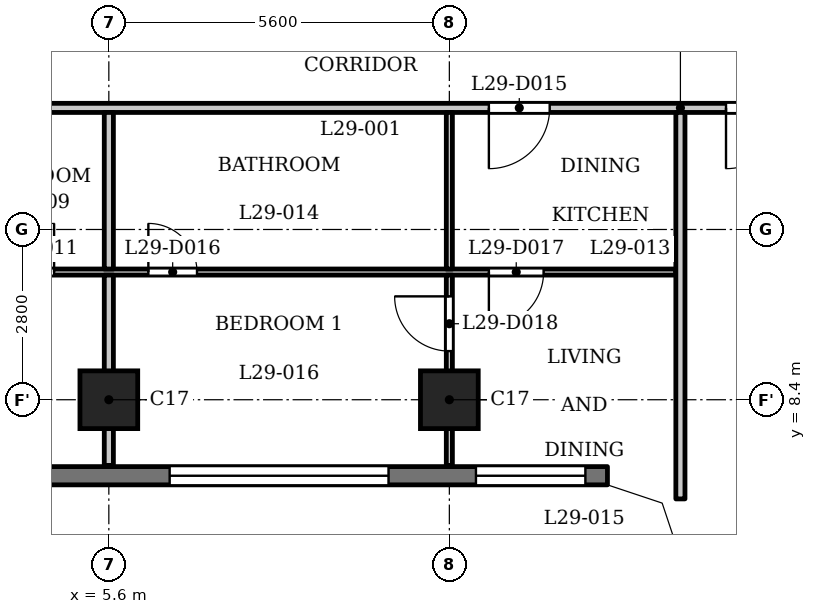
"""IFC4 building model, lengths in metres.
Left out: names, types, materials, properties, quantities, classifications, styles, units other than length and angle.
Written with IfcOpenShell. Run it as: python <this file> out.ifc"""

import sys

from ifc_helpers import new_model, si_unit, direction, frame, frame_2d, origin, origin_2d, place, context, subcontext, project, spatial, polyline, rectangle, outline, extrude, element, fill, save


model = new_model("IFC4")
c1 = context("Model", 3, precision=1e-05, world=origin(), true_north=direction((0.0, 1.0)))
c2 = subcontext(c1, "Body", "Model", "MODEL_VIEW")
j1 = project(units=[si_unit("LENGTHUNIT", "METRE"), si_unit("PLANEANGLEUNIT", "RADIAN")], contexts=[c1])
p1 = place(None, origin())
s1 = spatial("IfcSite", under=j1, at=p1, CompositionType="ELEMENT")
p2 = place(p1, origin())
s2 = spatial("IfcBuilding", under=s1, at=p2, CompositionType="ELEMENT")
p3 = place(p2, frame((0.0, 0.0, 114.8)))
s3 = spatial("IfcBuildingStorey", under=s2, at=p3, CompositionType="ELEMENT", Elevation=114.8)
for number, where, z_axis, x_axis in (
    (1, (5.6, 8.4, 0.0), (0.0, 0.0, 1.0), (1.0, 0.0, 0.0)),
    (2, (11.2, 8.4, 0.0), (0.0, 0.0, 1.0), (1.0, 0.0, 0.0)),
):
    element("IfcColumn", number, at=place(p3, frame(where, z_axis=z_axis, x_axis=x_axis)), inside=s3, PredefinedType="COLUMN", context=c2, shape_type="SweptSolid", body=[
        extrude(rectangle(XDim=0.95, YDim=0.95, at=origin_2d()), origin(), (0.0, 0.0, 1.0), 3.5),
    ])
p4 = place(p3, frame((-13.8, 7.15, 0.0), z_axis=(0.0, 0.0, 1.0), x_axis=(1.0, 0.0, 0.0)))
e3 = element("IfcWall", 3, at=p4, inside=s3, PredefinedType="SOLIDWALL", context=c2, shape_type="SweptSolid", body=[
    extrude(rectangle(XDim=27.6, YDim=0.3, at=frame_2d((13.8, 0.0))), origin(), (0.0, 0.0, 1.0), 3.2),
])
p5 = place(p4, frame((0.363, 0.0, 0.9)))
e4 = element("IfcOpeningElement", 4, at=p5, cuts=e3, PredefinedType="OPENING", context=c2, shape_type="SweptSolid", body=[
    extrude(rectangle(XDim=1.8, YDim=1.25, at=frame_2d((0.9, 0.625))), frame((0.0, 0.16, 0.0), z_axis=(0.0, -1.0, 0.0), x_axis=(1.0, 0.0, 0.0)), (0.0, 0.0, 1.0), 0.32),
])
p6 = place(p4, frame((3.6, 0.0, 1.2)))
e5 = element("IfcOpeningElement", 5, at=p6, cuts=e3, PredefinedType="OPENING", context=c2, shape_type="SweptSolid", body=[
    extrude(rectangle(XDim=3.6, YDim=0.95, at=frame_2d((1.8, 0.475))), frame((0.0, 0.16, 0.0), z_axis=(0.0, -1.0, 0.0), x_axis=(1.0, 0.0, 0.0)), (0.0, 0.0, 1.0), 0.32),
])
p7 = place(p4, frame((8.6, 0.0, 0.9)))
e6 = element("IfcOpeningElement", 6, at=p7, cuts=e3, PredefinedType="OPENING", context=c2, shape_type="SweptSolid", body=[
    extrude(rectangle(XDim=1.8, YDim=1.25, at=frame_2d((0.9, 0.625))), frame((0.0, 0.16, 0.0), z_axis=(0.0, -1.0, 0.0), x_axis=(1.0, 0.0, 0.0)), (0.0, 0.0, 1.0), 0.32),
])
p8 = place(p4, frame((11.4, 0.0, 0.9)))
e7 = element("IfcOpeningElement", 7, at=p8, cuts=e3, PredefinedType="OPENING", context=c2, shape_type="SweptSolid", body=[
    extrude(rectangle(XDim=1.8, YDim=1.25, at=frame_2d((0.9, 0.625))), frame((0.0, 0.16, 0.0), z_axis=(0.0, -1.0, 0.0), x_axis=(1.0, 0.0, 0.0)), (0.0, 0.0, 1.0), 0.32),
])
p9 = place(p4, frame((14.8, 0.0, 1.2)))
e8 = element("IfcOpeningElement", 8, at=p9, cuts=e3, PredefinedType="OPENING", context=c2, shape_type="SweptSolid", body=[
    extrude(rectangle(XDim=3.6, YDim=0.95, at=frame_2d((1.8, 0.475))), frame((0.0, 0.16, 0.0), z_axis=(0.0, -1.0, 0.0), x_axis=(1.0, 0.0, 0.0)), (0.0, 0.0, 1.0), 0.32),
])
p10 = place(p4, frame((20.4, 0.0, 1.2)))
e9 = element("IfcOpeningElement", 9, at=p10, cuts=e3, PredefinedType="OPENING", context=c2, shape_type="SweptSolid", body=[
    extrude(rectangle(XDim=3.6, YDim=0.95, at=frame_2d((1.8, 0.475))), frame((0.0, 0.16, 0.0), z_axis=(0.0, -1.0, 0.0), x_axis=(1.0, 0.0, 0.0)), (0.0, 0.0, 1.0), 0.32),
])
p11 = place(p4, frame((25.438, 0.0, 0.9)))
e10 = element("IfcOpeningElement", 10, at=p11, cuts=e3, PredefinedType="OPENING", context=c2, shape_type="SweptSolid", body=[
    extrude(rectangle(XDim=1.8, YDim=1.25, at=frame_2d((0.9, 0.625))), frame((0.0, 0.16, 0.0), z_axis=(0.0, -1.0, 0.0), x_axis=(1.0, 0.0, 0.0)), (0.0, 0.0, 1.0), 0.32),
])
p12 = place(p3, frame((-14.925, 10.5, 0.0), z_axis=(0.0, 0.0, 1.0), x_axis=(1.0, 0.0, 0.0)))
e11 = element("IfcWall", 11, at=p12, inside=s3, PredefinedType="PARTITIONING", context=c2, shape_type="SweptSolid", body=[
    extrude(rectangle(XDim=29.85, YDim=0.1, at=frame_2d((14.925, 0.0))), origin(), (0.0, 0.0, 1.0), 3.2),
])
p13 = place(p12, frame((0.525, 0.0, 0.0)))
e12 = element("IfcOpeningElement", 12, at=p13, cuts=e11, PredefinedType="OPENING", context=c2, shape_type="SweptSolid", body=[
    extrude(rectangle(XDim=0.8, YDim=2.1, at=frame_2d((0.4, 1.05))), frame((0.0, 0.06, 0.0), z_axis=(0.0, -1.0, 0.0), x_axis=(1.0, 0.0, 0.0)), (0.0, 0.0, 1.0), 0.12),
])
p14 = place(p12, frame((4.375, 0.0, 0.0)))
e13 = element("IfcOpeningElement", 13, at=p14, cuts=e11, PredefinedType="OPENING", context=c2, shape_type="SweptSolid", body=[
    extrude(rectangle(XDim=0.9, YDim=2.1, at=frame_2d((0.45, 1.05))), frame((0.0, 0.06, 0.0), z_axis=(0.0, -1.0, 0.0), x_axis=(1.0, 0.0, 0.0)), (0.0, 0.0, 1.0), 0.12),
])
p15 = place(p12, frame((18.825, 0.0, 0.0)))
e14 = element("IfcOpeningElement", 14, at=p15, cuts=e11, PredefinedType="OPENING", context=c2, shape_type="SweptSolid", body=[
    extrude(rectangle(XDim=0.8, YDim=2.1, at=frame_2d((0.4, 1.05))), frame((0.0, 0.06, 0.0), z_axis=(0.0, -1.0, 0.0), x_axis=(1.0, 0.0, 0.0)), (0.0, 0.0, 1.0), 0.12),
])
p16 = place(p12, frame((16.325, 0.0, 0.0)))
e15 = element("IfcOpeningElement", 15, at=p16, cuts=e11, PredefinedType="OPENING", context=c2, shape_type="SweptSolid", body=[
    extrude(rectangle(XDim=0.9, YDim=2.1, at=frame_2d((0.45, 1.05))), frame((0.0, 0.06, 0.0), z_axis=(0.0, -1.0, 0.0), x_axis=(1.0, 0.0, 0.0)), (0.0, 0.0, 1.0), 0.12),
])
p17 = place(p12, frame((10.225, 0.0, 0.0)))
e16 = element("IfcOpeningElement", 16, at=p17, cuts=e11, PredefinedType="OPENING", context=c2, shape_type="SweptSolid", body=[
    extrude(rectangle(XDim=0.9, YDim=2.1, at=frame_2d((0.45, 1.05))), frame((0.0, 0.06, 0.0), z_axis=(0.0, -1.0, 0.0), x_axis=(1.0, 0.0, 0.0)), (0.0, 0.0, 1.0), 0.12),
])
p18 = place(p12, frame((13.325, 0.0, 0.0)))
e17 = element("IfcOpeningElement", 17, at=p18, cuts=e11, PredefinedType="OPENING", context=c2, shape_type="SweptSolid", body=[
    extrude(rectangle(XDim=0.9, YDim=2.1, at=frame_2d((0.45, 1.05))), frame((0.0, 0.06, 0.0), z_axis=(0.0, -1.0, 0.0), x_axis=(1.0, 0.0, 0.0)), (0.0, 0.0, 1.0), 0.12),
])
p19 = place(p12, frame((21.175, 0.0, 0.0)))
e18 = element("IfcOpeningElement", 18, at=p19, cuts=e11, PredefinedType="OPENING", context=c2, shape_type="SweptSolid", body=[
    extrude(rectangle(XDim=0.8, YDim=2.1, at=frame_2d((0.4, 1.05))), frame((0.0, 0.06, 0.0), z_axis=(0.0, -1.0, 0.0), x_axis=(1.0, 0.0, 0.0)), (0.0, 0.0, 1.0), 0.12),
])
p20 = place(p12, frame((26.775, 0.0, 0.0)))
e19 = element("IfcOpeningElement", 19, at=p20, cuts=e11, PredefinedType="OPENING", context=c2, shape_type="SweptSolid", body=[
    extrude(rectangle(XDim=0.9, YDim=2.1, at=frame_2d((0.45, 1.05))), frame((0.0, 0.06, 0.0), z_axis=(0.0, -1.0, 0.0), x_axis=(1.0, 0.0, 0.0)), (0.0, 0.0, 1.0), 0.12),
])
p21 = place(p3, frame((-17.4, 13.2, 0.0), z_axis=(0.0, 0.0, 1.0), x_axis=(1.0, 0.0, 0.0)))
e20 = element("IfcWall", 20, at=p21, inside=s3, PredefinedType="PARTITIONING", context=c2, shape_type="SweptSolid", body=[
    extrude(rectangle(XDim=34.8, YDim=0.15, at=frame_2d((17.4, 0.0))), origin(), (0.0, 0.0, 1.0), 3.2),
])
p22 = place(p21, frame((0.75, 0.0, 0.0)))
e21 = element("IfcOpeningElement", 21, at=p22, cuts=e20, PredefinedType="OPENING", context=c2, shape_type="SweptSolid", body=[
    extrude(rectangle(XDim=1.0, YDim=2.1, at=frame_2d((0.5, 1.05))), frame((0.0, 0.085, 0.0), z_axis=(0.0, -1.0, 0.0), x_axis=(1.0, 0.0, 0.0)), (0.0, 0.0, 1.0), 0.17),
])
p23 = place(p21, frame((33.15, 0.0, 0.0)))
e22 = element("IfcOpeningElement", 22, at=p23, cuts=e20, PredefinedType="OPENING", context=c2, shape_type="SweptSolid", body=[
    extrude(rectangle(XDim=1.0, YDim=2.1, at=frame_2d((0.5, 1.05))), frame((0.0, 0.085, 0.0), z_axis=(0.0, -1.0, 0.0), x_axis=(1.0, 0.0, 0.0)), (0.0, 0.0, 1.0), 0.17),
])
p24 = place(p21, frame((6.85, 0.0, 0.0)))
e23 = element("IfcOpeningElement", 23, at=p24, cuts=e20, PredefinedType="OPENING", context=c2, shape_type="SweptSolid", body=[
    extrude(rectangle(XDim=1.0, YDim=2.1, at=frame_2d((0.5, 1.05))), frame((0.0, 0.085, 0.0), z_axis=(0.0, -1.0, 0.0), x_axis=(1.0, 0.0, 0.0)), (0.0, 0.0, 1.0), 0.17),
])
p25 = place(p21, frame((12.45, 0.0, 0.0)))
e24 = element("IfcOpeningElement", 24, at=p25, cuts=e20, PredefinedType="OPENING", context=c2, shape_type="SweptSolid", body=[
    extrude(rectangle(XDim=1.0, YDim=2.1, at=frame_2d((0.5, 1.05))), frame((0.0, 0.085, 0.0), z_axis=(0.0, -1.0, 0.0), x_axis=(1.0, 0.0, 0.0)), (0.0, 0.0, 1.0), 0.17),
])
p26 = place(p21, frame((29.25, 0.0, 0.0)))
e25 = element("IfcOpeningElement", 25, at=p26, cuts=e20, PredefinedType="OPENING", context=c2, shape_type="SweptSolid", body=[
    extrude(rectangle(XDim=1.0, YDim=2.1, at=frame_2d((0.5, 1.05))), frame((0.0, 0.085, 0.0), z_axis=(0.0, -1.0, 0.0), x_axis=(1.0, 0.0, 0.0)), (0.0, 0.0, 1.0), 0.17),
])
p27 = place(p3, frame((5.6, 7.32, 0.0), z_axis=(0.0, 0.0, 1.0), x_axis=(0.0, 1.0, 0.0)))
e26 = element("IfcWall", 26, at=p27, inside=s3, PredefinedType="PARTITIONING", context=c2, shape_type="SweptSolid", body=[
    extrude(rectangle(XDim=3.13, YDim=0.15, at=frame_2d((1.565, 0.0))), origin(), (0.0, 0.0, 1.0), 3.2),
])
p28 = place(p3, frame((5.6, 10.55, 0.0), z_axis=(0.0, 0.0, 1.0), x_axis=(0.0, 1.0, 0.0)))
e27 = element("IfcWall", 27, at=p28, inside=s3, PredefinedType="PARTITIONING", context=c2, shape_type="SweptSolid", body=[
    extrude(rectangle(XDim=2.575, YDim=0.15, at=frame_2d((1.288, 0.0))), origin(), (0.0, 0.0, 1.0), 3.2),
])
p29 = place(p3, frame((11.2, 7.32, 0.0), z_axis=(0.0, 0.0, 1.0), x_axis=(0.0, 1.0, 0.0)))
e28 = element("IfcWall", 28, at=p29, inside=s3, PredefinedType="PARTITIONING", context=c2, shape_type="SweptSolid", body=[
    extrude(rectangle(XDim=3.13, YDim=0.1, at=frame_2d((1.565, 0.0))), origin(), (0.0, 0.0, 1.0), 3.2),
])
p30 = place(p29, frame((1.88, 0.0, 0.0)))
e29 = element("IfcOpeningElement", 29, at=p30, cuts=e28, PredefinedType="OPENING", context=c2, shape_type="SweptSolid", body=[
    extrude(rectangle(XDim=0.9, YDim=2.1, at=frame_2d((0.45, 1.05))), frame((0.0, 0.06, 0.0), z_axis=(0.0, -1.0, 0.0), x_axis=(1.0, 0.0, 0.0)), (0.0, 0.0, 1.0), 0.12),
])
p31 = place(p3, frame((11.2, 10.55, 0.0), z_axis=(0.0, 0.0, 1.0), x_axis=(0.0, 1.0, 0.0)))
e30 = element("IfcWall", 30, at=p31, inside=s3, PredefinedType="PARTITIONING", context=c2, shape_type="SweptSolid", body=[
    extrude(rectangle(XDim=2.575, YDim=0.1, at=frame_2d((1.288, 0.0))), origin(), (0.0, 0.0, 1.0), 3.2),
])
p32 = place(p3, frame((15.0, 6.769, 0.0), z_axis=(0.0, 0.0, 1.0), x_axis=(0.0, 1.0, 0.0)))
e31 = element("IfcWall", 31, at=p32, inside=s3, PredefinedType="PARTITIONING", context=c2, shape_type="SweptSolid", body=[
    extrude(rectangle(XDim=6.356, YDim=0.15, at=frame_2d((3.178, 0.0))), origin(), (0.0, 0.0, 1.0), 3.2),
])
p33 = place(p3, origin())
e32 = element("IfcWall", 32, at=p33, inside=s3, PredefinedType="SOLIDWALL", context=c2, shape_type="SweptSolid", body=[
    extrude(outline(polyline([(14.937, 6.937), (13.849, 7.3), (13.8, 7.3), (13.8, 7.0), (14.7, 6.7), (15.0, 5.8), (15.3, 5.8), (15.3, 5.849), (14.937, 6.937)])), origin(), (0.0, 0.0, 1.0), 3.2),
])
p34 = place(p23, origin())
e33 = element("IfcDoor", 33, at=p34, inside=s3, OperationType="SINGLE_SWING_LEFT", PredefinedType="DOOR", context=c2, shape_type="SweptSolid", body=[
    extrude(rectangle(XDim=1.0, YDim=2.1, at=frame_2d((0.5, 1.05))), frame((0.0, 0.025, 0.0), z_axis=(0.0, -1.0, 0.0), x_axis=(1.0, 0.0, 0.0)), (0.0, 0.0, 1.0), 0.05),
])
fill(e22, e33)
p35 = place(p15, origin())
e34 = element("IfcDoor", 34, at=p35, inside=s3, OperationType="SINGLE_SWING_LEFT", PredefinedType="DOOR", context=c2, shape_type="SweptSolid", body=[
    extrude(rectangle(XDim=0.8, YDim=2.1, at=frame_2d((0.4, 1.05))), frame((0.0, 0.025, 0.0), z_axis=(0.0, -1.0, 0.0), x_axis=(1.0, 0.0, 0.0)), (0.0, 0.0, 1.0), 0.05),
])
fill(e14, e34)
p36 = place(p26, origin())
e35 = element("IfcDoor", 35, at=p36, inside=s3, OperationType="SINGLE_SWING_LEFT", PredefinedType="DOOR", context=c2, shape_type="SweptSolid", body=[
    extrude(rectangle(XDim=1.0, YDim=2.1, at=frame_2d((0.5, 1.05))), frame((0.0, 0.025, 0.0), z_axis=(0.0, -1.0, 0.0), x_axis=(1.0, 0.0, 0.0)), (0.0, 0.0, 1.0), 0.05),
])
fill(e25, e35)
p37 = place(p19, origin())
e36 = element("IfcDoor", 36, at=p37, inside=s3, OperationType="SINGLE_SWING_RIGHT", PredefinedType="DOOR", context=c2, shape_type="SweptSolid", body=[
    extrude(rectangle(XDim=0.8, YDim=2.1, at=frame_2d((0.4, 1.05))), frame((0.0, 0.025, 0.0), z_axis=(0.0, -1.0, 0.0), x_axis=(1.0, 0.0, 0.0)), (0.0, 0.0, 1.0), 0.05),
])
fill(e18, e36)
p38 = place(p20, origin())
e37 = element("IfcDoor", 37, at=p38, inside=s3, OperationType="SINGLE_SWING_LEFT", PredefinedType="DOOR", context=c2, shape_type="SweptSolid", body=[
    extrude(rectangle(XDim=0.9, YDim=2.1, at=frame_2d((0.45, 1.05))), frame((0.0, 0.025, 0.0), z_axis=(0.0, -1.0, 0.0), x_axis=(1.0, 0.0, 0.0)), (0.0, 0.0, 1.0), 0.05),
])
fill(e19, e37)
p39 = place(p30, origin())
e38 = element("IfcDoor", 38, at=p39, inside=s3, OperationType="SINGLE_SWING_LEFT", PredefinedType="DOOR", context=c2, shape_type="SweptSolid", body=[
    extrude(rectangle(XDim=0.9, YDim=2.1, at=frame_2d((0.45, 1.05))), frame((0.0, 0.025, 0.0), z_axis=(0.0, -1.0, 0.0), x_axis=(1.0, 0.0, 0.0)), (0.0, 0.0, 1.0), 0.05),
])
fill(e29, e38)
p40 = place(p10, origin())
e39 = element("IfcWindow", 39, at=p40, inside=s3, PartitioningType="SINGLE_PANEL", PredefinedType="WINDOW", context=c2, shape_type="SweptSolid", body=[
    extrude(rectangle(XDim=3.6, YDim=0.95, at=frame_2d((1.8, 0.475))), frame((0.0, 0.03, 0.0), z_axis=(0.0, -1.0, 0.0), x_axis=(1.0, 0.0, 0.0)), (0.0, 0.0, 1.0), 0.06),
])
fill(e9, e39)
p41 = place(p11, origin())
e40 = element("IfcWindow", 40, at=p41, inside=s3, PartitioningType="SINGLE_PANEL", PredefinedType="WINDOW", context=c2, shape_type="SweptSolid", body=[
    extrude(rectangle(XDim=1.8, YDim=1.25, at=frame_2d((0.9, 0.625))), frame((0.0, 0.03, 0.0), z_axis=(0.0, -1.0, 0.0), x_axis=(1.0, 0.0, 0.0)), (0.0, 0.0, 1.0), 0.06),
])
fill(e10, e40)
save(model, sys.argv[1])
